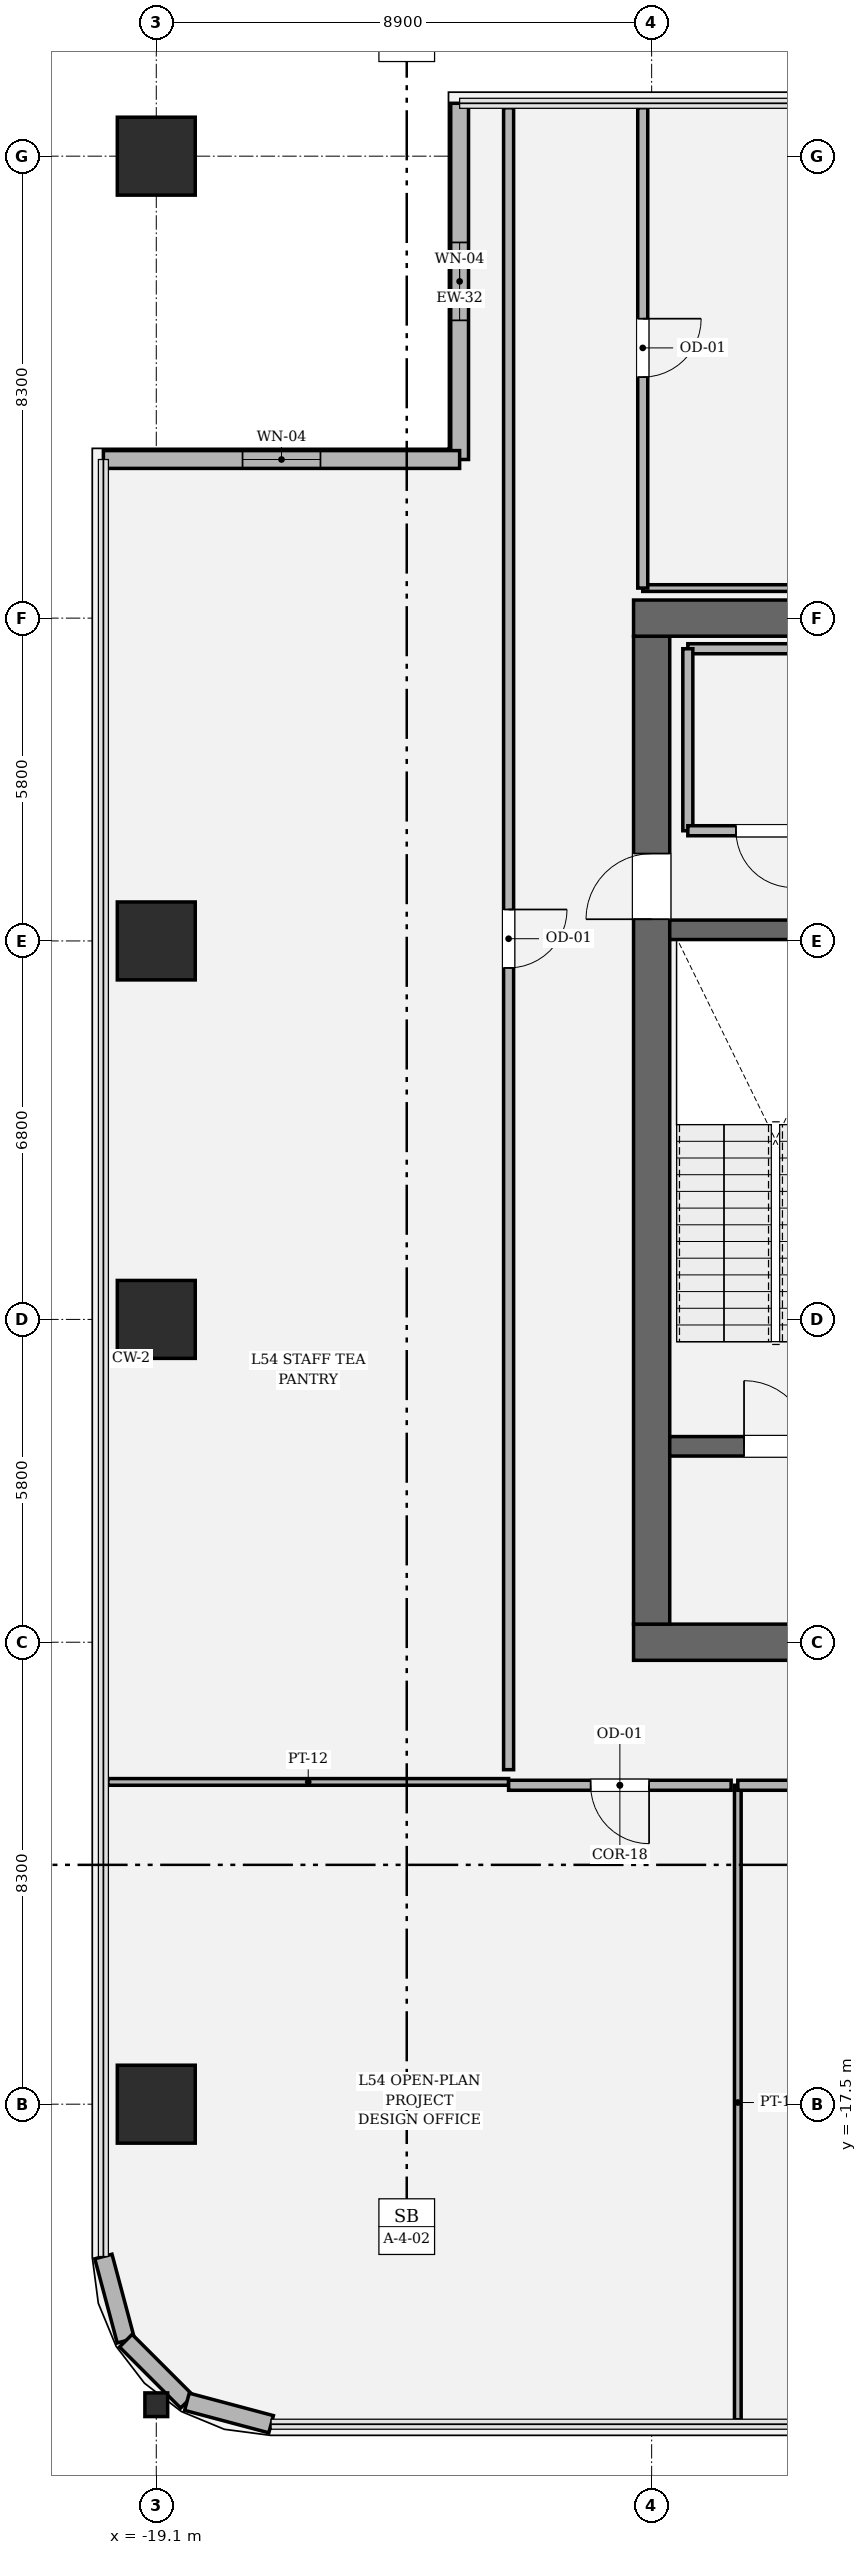
"""IFC4 building model, lengths in metres.
Left out: names, types, materials, properties, quantities, classifications, styles, units other than length and angle.
Written with IfcOpenShell. Run it as: python <this file> out.ifc"""

import sys

from ifc_helpers import new_model, si_unit, direction, frame, frame_2d, origin, origin_2d, place, context, subcontext, project, spatial, rectangle, hollow_rectangle, i_section, extrude, element, fill, save


model = new_model("IFC4")
c1 = context("Model", 3, precision=1e-05, world=origin(), true_north=direction((0.0, 1.0)))
c2 = subcontext(c1, "Body", "Model", "MODEL_VIEW")
j1 = project(units=[si_unit("LENGTHUNIT", "METRE"), si_unit("PLANEANGLEUNIT", "RADIAN")], contexts=[c1])
p1 = place(None, origin())
s1 = spatial("IfcSite", under=j1, at=p1, CompositionType="ELEMENT")
p2 = place(p1, origin())
s2 = spatial("IfcBuilding", under=s1, at=p2, CompositionType="ELEMENT")
p3 = place(p2, frame((0.0, 0.0, 228.9)))
s3 = spatial("IfcBuildingStorey", under=s2, at=p3, CompositionType="ELEMENT", Elevation=228.9)
p4 = place(p3, frame((10.525, -9.2, 0.0), z_axis=(0.0, 0.0, 1.0), x_axis=(-1.0, 0.0, 0.0)))
e1 = element("IfcWall", 1, at=p4, inside=s3, PredefinedType="SHEAR", context=c2, shape_type="SweptSolid", body=[
    extrude(rectangle(XDim=21.05, YDim=0.65, at=frame_2d((10.525, 0.0))), origin(), (0.0, 0.0, 1.0), 4.05),
])
p5 = place(p4, frame((2.8, 0.0, 0.0)))
e2 = element("IfcOpeningElement", 2, at=p5, cuts=e1, PredefinedType="OPENING", context=c2, shape_type="SweptSolid", body=[
    extrude(rectangle(XDim=1.25, YDim=2.25, at=frame_2d((0.625, 1.125))), frame((0.0, 0.335, 0.0), z_axis=(0.0, -1.0, 0.0), x_axis=(1.0, 0.0, 0.0)), (0.0, 0.0, 1.0), 0.67),
])
p6 = place(p4, frame((17.0, 0.0, 0.0)))
e3 = element("IfcOpeningElement", 3, at=p6, cuts=e1, PredefinedType="OPENING", context=c2, shape_type="SweptSolid", body=[
    extrude(rectangle(XDim=1.25, YDim=2.25, at=frame_2d((0.625, 1.125))), frame((0.0, 0.335, 0.0), z_axis=(0.0, -1.0, 0.0), x_axis=(1.0, 0.0, 0.0)), (0.0, 0.0, 1.0), 0.67),
])
p7 = place(p3, frame((-10.2, -8.875, 0.0), z_axis=(0.0, 0.0, 1.0), x_axis=(0.0, 1.0, 0.0)))
e4 = element("IfcWall", 4, at=p7, inside=s3, PredefinedType="SHEAR", context=c2, shape_type="SweptSolid", body=[
    extrude(rectangle(XDim=17.75, YDim=0.65, at=frame_2d((8.875, 0.0))), origin(), (0.0, 0.0, 1.0), 4.05),
])
p8 = place(p7, frame((12.665, 0.0, 0.0)))
e5 = element("IfcOpeningElement", 5, at=p8, cuts=e4, PredefinedType="OPENING", context=c2, shape_type="SweptSolid", body=[
    extrude(rectangle(XDim=1.18, YDim=2.2, at=frame_2d((0.59, 1.1))), frame((0.0, 0.335, 0.0), z_axis=(0.0, -1.0, 0.0), x_axis=(1.0, 0.0, 0.0)), (0.0, 0.0, 1.0), 0.67),
])
p9 = place(p3, frame((-10.525, 9.2, 0.0), z_axis=(0.0, 0.0, 1.0), x_axis=(1.0, 0.0, 0.0)))
e6 = element("IfcWall", 6, at=p9, inside=s3, PredefinedType="SHEAR", context=c2, shape_type="SweptSolid", body=[
    extrude(rectangle(XDim=21.05, YDim=0.65, at=frame_2d((10.525, 0.0))), origin(), (0.0, 0.0, 1.0), 4.05),
])
p10 = place(p3, frame((-9.875, -5.68, 0.0), z_axis=(0.0, 0.0, 1.0), x_axis=(1.0, 0.0, 0.0)))
e7 = element("IfcWall", 7, at=p10, inside=s3, PredefinedType="SOLIDWALL", context=c2, shape_type="SweptSolid", body=[
    extrude(rectangle(XDim=5.225, YDim=0.35, at=frame_2d((2.613, 0.0))), origin(), (0.0, 0.0, 1.0), 4.05),
])
p11 = place(p10, frame((1.335, 0.0, 0.0)))
e8 = element("IfcOpeningElement", 8, at=p11, cuts=e7, PredefinedType="OPENING", context=c2, shape_type="SweptSolid", body=[
    extrude(rectangle(XDim=1.18, YDim=2.2, at=frame_2d((0.59, 1.1))), frame((0.0, 0.185, 0.0), z_axis=(0.0, -1.0, 0.0), x_axis=(1.0, 0.0, 0.0)), (0.0, 0.0, 1.0), 0.37),
])
p12 = place(p3, frame((-9.875, 3.6, 0.0), z_axis=(0.0, 0.0, 1.0), x_axis=(1.0, 0.0, 0.0)))
e9 = element("IfcWall", 9, at=p12, inside=s3, PredefinedType="SOLIDWALL", context=c2, shape_type="SweptSolid", body=[
    extrude(rectangle(XDim=5.225, YDim=0.35, at=frame_2d((2.613, 0.0))), origin(), (0.0, 0.0, 1.0), 4.05),
])
for number, where, z_axis, x_axis in (
    (10, (-19.1, -17.5, 0.0), (0.0, 0.0, 1.0), (1.0, 0.0, 0.0)),
    (11, (-19.1, 17.5, 0.0), (0.0, 0.0, 1.0), (1.0, 0.0, 0.0)),
    (12, (-19.1, 3.4, 0.0), (0.0, 0.0, 1.0), (1.0, 0.0, 0.0)),
    (13, (-19.1, -3.4, 0.0), (0.0, 0.0, 1.0), (1.0, 0.0, 0.0)),
):
    element("IfcColumn", number, at=place(p3, frame(where, z_axis=z_axis, x_axis=x_axis)), inside=s3, PredefinedType="COLUMN", context=c2, shape_type="SweptSolid", body=[
        extrude(hollow_rectangle(XDim=1.4, YDim=1.4, WallThickness=0.042, at=origin_2d()), origin(), (0.0, 0.0, 1.0), 4.05),
    ])
p13 = place(p3, frame((-19.1, -22.9, 0.0), z_axis=(0.0, 0.0, 1.0), x_axis=(1.0, 0.0, 0.0)))
e14 = element("IfcColumn", 14, at=p13, inside=s3, PredefinedType="COLUMN", context=c2, shape_type="SweptSolid", body=[
    extrude(i_section(OverallWidth=0.409, OverallDepth=0.425, WebThickness=0.032, FlangeThickness=0.052, FilletRadius=0.018, at=origin_2d()), origin(), (0.0, 0.0, 1.0), 4.048),
])
p14 = place(p3, frame((-13.65, 18.45, 0.0), z_axis=(0.0, 0.0, 1.0), x_axis=(0.0, -1.0, 0.0)))
e15 = element("IfcWall", 15, at=p14, inside=s3, PredefinedType="SOLIDWALL", context=c2, shape_type="SweptSolid", body=[
    extrude(rectangle(XDim=6.4, YDim=0.32, at=frame_2d((3.2, 0.0))), origin(), (0.0, 0.0, 1.0), 3.174),
])
p15 = place(p14, frame((2.5, 0.0, 0.734)))
e16 = element("IfcOpeningElement", 16, at=p15, cuts=e15, PredefinedType="OPENING", context=c2, shape_type="SweptSolid", body=[
    extrude(rectangle(XDim=1.4, YDim=2.2, at=frame_2d((0.7, 1.1))), frame((0.0, 0.17, 0.0), z_axis=(0.0, -1.0, 0.0), x_axis=(1.0, 0.0, 0.0)), (0.0, 0.0, 1.0), 0.34),
])
p16 = place(p3, frame((-13.65, 12.05, 0.0), z_axis=(0.0, 0.0, 1.0), x_axis=(-1.0, 0.0, 0.0)))
e17 = element("IfcWall", 17, at=p16, inside=s3, PredefinedType="SOLIDWALL", context=c2, shape_type="SweptSolid", body=[
    extrude(rectangle(XDim=6.4, YDim=0.32, at=frame_2d((3.2, 0.0))), origin(), (0.0, 0.0, 1.0), 3.174),
])
p17 = place(p16, frame((2.5, 0.0, 0.734)))
e18 = element("IfcOpeningElement", 18, at=p17, cuts=e17, PredefinedType="OPENING", context=c2, shape_type="SweptSolid", body=[
    extrude(rectangle(XDim=1.4, YDim=2.2, at=frame_2d((0.7, 1.1))), frame((0.0, 0.17, 0.0), z_axis=(0.0, -1.0, 0.0), x_axis=(1.0, 0.0, 0.0)), (0.0, 0.0, 1.0), 0.34),
])
p18 = place(p3, frame((-20.05, -20.237, 0.0), z_axis=(0.0, 0.0, 1.0), x_axis=(0.257847112249, -0.966185730957, 0.0)))
e19 = element("IfcWall", 19, at=p18, inside=s3, PredefinedType="SOLIDWALL", context=c2, shape_type="SweptSolid", body=[
    extrude(rectangle(XDim=1.565, YDim=0.32, at=frame_2d((0.783, 0.0))), origin(), (0.0, 0.0, 1.0), 3.83),
])
p19 = place(p3, frame((-19.646, -21.749, 0.0), z_axis=(0.0, 0.0, 1.0), x_axis=(0.707028130747, -0.707185422879, 0.0)))
e20 = element("IfcWall", 20, at=p19, inside=s3, PredefinedType="SOLIDWALL", context=c2, shape_type="SweptSolid", body=[
    extrude(rectangle(XDim=1.552, YDim=0.32, at=frame_2d((0.776, 0.0))), origin(), (0.0, 0.0, 1.0), 2.504),
])
p20 = place(p3, frame((-18.549, -22.847, 0.0), z_axis=(0.0, 0.0, 1.0), x_axis=(0.966224582397, -0.257701486942, 0.0)))
e21 = element("IfcWall", 21, at=p20, inside=s3, PredefinedType="SOLIDWALL", context=c2, shape_type="SweptSolid", body=[
    extrude(rectangle(XDim=1.565, YDim=0.32, at=frame_2d((0.783, 0.0))), origin(), (0.0, 0.0, 1.0), 2.544),
])
p21 = place(p3, frame((-6.8, 8.65, 0.0), z_axis=(0.0, 0.0, 1.0), x_axis=(-1.0, 0.0, 0.0)))
e22 = element("IfcWall", 22, at=p21, inside=s3, PredefinedType="PARTITIONING", context=c2, shape_type="SweptSolid", body=[
    extrude(rectangle(XDim=2.75, YDim=0.18, at=frame_2d((1.375, 0.0))), origin(), (0.0, 0.0, 1.0), 3.83),
])
p22 = place(p3, frame((-9.55, 8.65, 0.0), z_axis=(0.0, 0.0, 1.0), x_axis=(0.0, -1.0, 0.0)))
e23 = element("IfcWall", 23, at=p22, inside=s3, PredefinedType="PARTITIONING", context=c2, shape_type="SweptSolid", body=[
    extrude(rectangle(XDim=3.27, YDim=0.18, at=frame_2d((1.635, 0.0))), origin(), (0.0, 0.0, 1.0), 3.83),
])
p23 = place(p3, frame((-9.55, 5.38, 0.0), z_axis=(0.0, 0.0, 1.0), x_axis=(1.0, 0.0, 0.0)))
e24 = element("IfcWall", 24, at=p23, inside=s3, PredefinedType="PARTITIONING", context=c2, shape_type="SweptSolid", body=[
    extrude(rectangle(XDim=2.75, YDim=0.18, at=frame_2d((1.375, 0.0))), origin(), (0.0, 0.0, 1.0), 3.83),
])
p24 = place(p23, frame((0.865, 0.0, 0.0)))
e25 = element("IfcOpeningElement", 25, at=p24, cuts=e24, PredefinedType="OPENING", context=c2, shape_type="SweptSolid", body=[
    extrude(rectangle(XDim=1.02, YDim=2.2, at=frame_2d((0.51, 1.1))), frame((0.0, 0.1, 0.0), z_axis=(0.0, -1.0, 0.0), x_axis=(1.0, 0.0, 0.0)), (0.0, 0.0, 1.0), 0.2),
])
p25 = place(p3, frame((-8.652, -23.17, 0.0), z_axis=(0.0, 0.0, 1.0), x_axis=(0.0, 1.0, 0.0)))
e26 = element("IfcWall", 26, at=p25, inside=s3, PredefinedType="PARTITIONING", context=c2, shape_type="SweptSolid", body=[
    extrude(rectangle(XDim=11.4, YDim=0.12, at=frame_2d((5.7, 0.0))), origin(), (0.0, 0.0, 1.0), 2.544),
])
p26 = place(p3, frame((-8.652, -11.77, 0.0), z_axis=(0.0, 0.0, 1.0), x_axis=(1.0, 0.0, 0.0)))
e27 = element("IfcWall", 27, at=p26, inside=s3, PredefinedType="PARTITIONING", context=c2, shape_type="SweptSolid", body=[
    extrude(rectangle(XDim=7.452, YDim=0.18, at=frame_2d((3.726, 0.0))), origin(), (0.0, 0.0, 1.0), 3.174),
])
p27 = place(p3, frame((-19.97, -11.71, 0.0), z_axis=(0.0, 0.0, 1.0), x_axis=(1.0, 0.0, 0.0)))
e28 = element("IfcWall", 28, at=p27, inside=s3, PredefinedType="PARTITIONING", context=c2, shape_type="SweptSolid", body=[
    extrude(rectangle(XDim=7.2, YDim=0.12, at=frame_2d((3.6, 0.0))), origin(), (0.0, 0.0, 1.0), 3.174),
])
p28 = place(p3, frame((-12.77, -11.77, 0.0), z_axis=(0.0, 0.0, 1.0), x_axis=(1.0, 0.0, 0.0)))
e29 = element("IfcWall", 29, at=p28, inside=s3, PredefinedType="PARTITIONING", context=c2, shape_type="SweptSolid", body=[
    extrude(rectangle(XDim=3.998, YDim=0.18, at=frame_2d((1.999, 0.0))), origin(), (0.0, 0.0, 1.0), 3.174),
])
p29 = place(p28, frame((1.474, 0.0, 0.0)))
e30 = element("IfcOpeningElement", 30, at=p29, cuts=e29, PredefinedType="OPENING", context=c2, shape_type="SweptSolid", body=[
    extrude(rectangle(XDim=1.05, YDim=2.2, at=frame_2d((0.525, 1.1))), frame((0.0, 0.1, 0.0), z_axis=(0.0, -1.0, 0.0), x_axis=(1.0, 0.0, 0.0)), (0.0, 0.0, 1.0), 0.2),
])
p30 = place(p3, frame((-12.77, 18.37, 0.0), z_axis=(0.0, 0.0, 1.0), x_axis=(0.0, -1.0, 0.0)))
e31 = element("IfcWall", 31, at=p30, inside=s3, PredefinedType="PARTITIONING", context=c2, shape_type="SweptSolid", body=[
    extrude(rectangle(XDim=29.86, YDim=0.18, at=frame_2d((14.93, 0.0))), origin(), (0.0, 0.0, 1.0), 3.174),
])
p31 = place(p30, frame((14.405, 0.0, 0.0)))
e32 = element("IfcOpeningElement", 32, at=p31, cuts=e31, PredefinedType="OPENING", context=c2, shape_type="SweptSolid", body=[
    extrude(rectangle(XDim=1.05, YDim=2.2, at=frame_2d((0.525, 1.1))), frame((0.0, 0.1, 0.0), z_axis=(0.0, -1.0, 0.0), x_axis=(1.0, 0.0, 0.0)), (0.0, 0.0, 1.0), 0.2),
])
p32 = place(p3, frame((-0.06, 9.74, 0.0), z_axis=(0.0, 0.0, 1.0), x_axis=(-1.0, 0.0, 0.0)))
e33 = element("IfcWall", 33, at=p32, inside=s3, PredefinedType="PARTITIONING", context=c2, shape_type="SweptSolid", body=[
    extrude(rectangle(XDim=10.3, YDim=0.12, at=frame_2d((5.15, 0.0))), origin(), (0.0, 0.0, 1.0), 3.174),
])
p33 = place(p3, frame((-10.36, 9.74, 0.0), z_axis=(0.0, 0.0, 1.0), x_axis=(0.0, 1.0, 0.0)))
e34 = element("IfcWall", 34, at=p33, inside=s3, PredefinedType="PARTITIONING", context=c2, shape_type="SweptSolid", body=[
    extrude(rectangle(XDim=8.63, YDim=0.18, at=frame_2d((4.315, 0.0))), origin(), (0.0, 0.0, 1.0), 3.174),
])
p34 = place(p33, frame((3.79, 0.0, 0.0)))
e35 = element("IfcOpeningElement", 35, at=p34, cuts=e34, PredefinedType="OPENING", context=c2, shape_type="SweptSolid", body=[
    extrude(rectangle(XDim=1.05, YDim=2.2, at=frame_2d((0.525, 1.1))), frame((0.0, 0.1, 0.0), z_axis=(0.0, -1.0, 0.0), x_axis=(1.0, 0.0, 0.0)), (0.0, 0.0, 1.0), 0.2),
])
p35 = place(p15, origin())
e36 = element("IfcWindow", 36, at=p35, inside=s3, PartitioningType="SINGLE_PANEL", PredefinedType="WINDOW", context=c2, shape_type="SweptSolid", body=[
    extrude(rectangle(XDim=1.4, YDim=2.2, at=frame_2d((0.7, 1.1))), frame((0.0, 0.03, 0.0), z_axis=(0.0, -1.0, 0.0), x_axis=(1.0, 0.0, 0.0)), (0.0, 0.0, 1.0), 0.06),
])
fill(e16, e36)
p36 = place(p17, origin())
e37 = element("IfcWindow", 37, at=p36, inside=s3, PartitioningType="SINGLE_PANEL", PredefinedType="WINDOW", context=c2, shape_type="SweptSolid", body=[
    extrude(rectangle(XDim=1.4, YDim=2.2, at=frame_2d((0.7, 1.1))), frame((0.0, 0.03, 0.0), z_axis=(0.0, -1.0, 0.0), x_axis=(1.0, 0.0, 0.0)), (0.0, 0.0, 1.0), 0.06),
])
fill(e18, e37)
p37 = place(p11, origin())
e38 = element("IfcDoor", 38, at=p37, inside=s3, OperationType="SINGLE_SWING_LEFT", PredefinedType="DOOR", context=c2, shape_type="SweptSolid", body=[
    extrude(rectangle(XDim=1.18, YDim=2.2, at=frame_2d((0.59, 1.1))), frame((0.0, 0.025, 0.0), z_axis=(0.0, -1.0, 0.0), x_axis=(1.0, 0.0, 0.0)), (0.0, 0.0, 1.0), 0.05),
])
fill(e8, e38)
p38 = place(p8, origin())
e39 = element("IfcDoor", 39, at=p38, inside=s3, OperationType="SINGLE_SWING_LEFT", PredefinedType="DOOR", context=c2, shape_type="SweptSolid", body=[
    extrude(rectangle(XDim=1.18, YDim=2.2, at=frame_2d((0.59, 1.1))), frame((0.0, 0.025, 0.0), z_axis=(0.0, -1.0, 0.0), x_axis=(1.0, 0.0, 0.0)), (0.0, 0.0, 1.0), 0.05),
])
fill(e5, e39)
p39 = place(p24, origin())
e40 = element("IfcDoor", 40, at=p39, inside=s3, OperationType="SINGLE_SWING_RIGHT", PredefinedType="DOOR", context=c2, shape_type="SweptSolid", body=[
    extrude(rectangle(XDim=1.02, YDim=2.2, at=frame_2d((0.51, 1.1))), frame((0.0, 0.025, 0.0), z_axis=(0.0, -1.0, 0.0), x_axis=(1.0, 0.0, 0.0)), (0.0, 0.0, 1.0), 0.05),
])
fill(e25, e40)
p40 = place(p29, origin())
e41 = element("IfcDoor", 41, at=p40, inside=s3, OperationType="SINGLE_SWING_RIGHT", PredefinedType="DOOR", context=c2, shape_type="SweptSolid", body=[
    extrude(rectangle(XDim=1.05, YDim=2.2, at=frame_2d((0.525, 1.1))), frame((0.0, 0.025, 0.0), z_axis=(0.0, -1.0, 0.0), x_axis=(1.0, 0.0, 0.0)), (0.0, 0.0, 1.0), 0.05),
])
fill(e30, e41)
p41 = place(p31, origin())
e42 = element("IfcDoor", 42, at=p41, inside=s3, OperationType="SINGLE_SWING_LEFT", PredefinedType="DOOR", context=c2, shape_type="SweptSolid", body=[
    extrude(rectangle(XDim=1.05, YDim=2.2, at=frame_2d((0.525, 1.1))), frame((0.0, 0.025, 0.0), z_axis=(0.0, -1.0, 0.0), x_axis=(1.0, 0.0, 0.0)), (0.0, 0.0, 1.0), 0.05),
])
fill(e32, e42)
p42 = place(p34, origin())
e43 = element("IfcDoor", 43, at=p42, inside=s3, OperationType="SINGLE_SWING_RIGHT", PredefinedType="DOOR", context=c2, shape_type="SweptSolid", body=[
    extrude(rectangle(XDim=1.05, YDim=2.2, at=frame_2d((0.525, 1.1))), frame((0.0, 0.025, 0.0), z_axis=(0.0, -1.0, 0.0), x_axis=(1.0, 0.0, 0.0)), (0.0, 0.0, 1.0), 0.05),
])
fill(e35, e43)
save(model, sys.argv[1])
